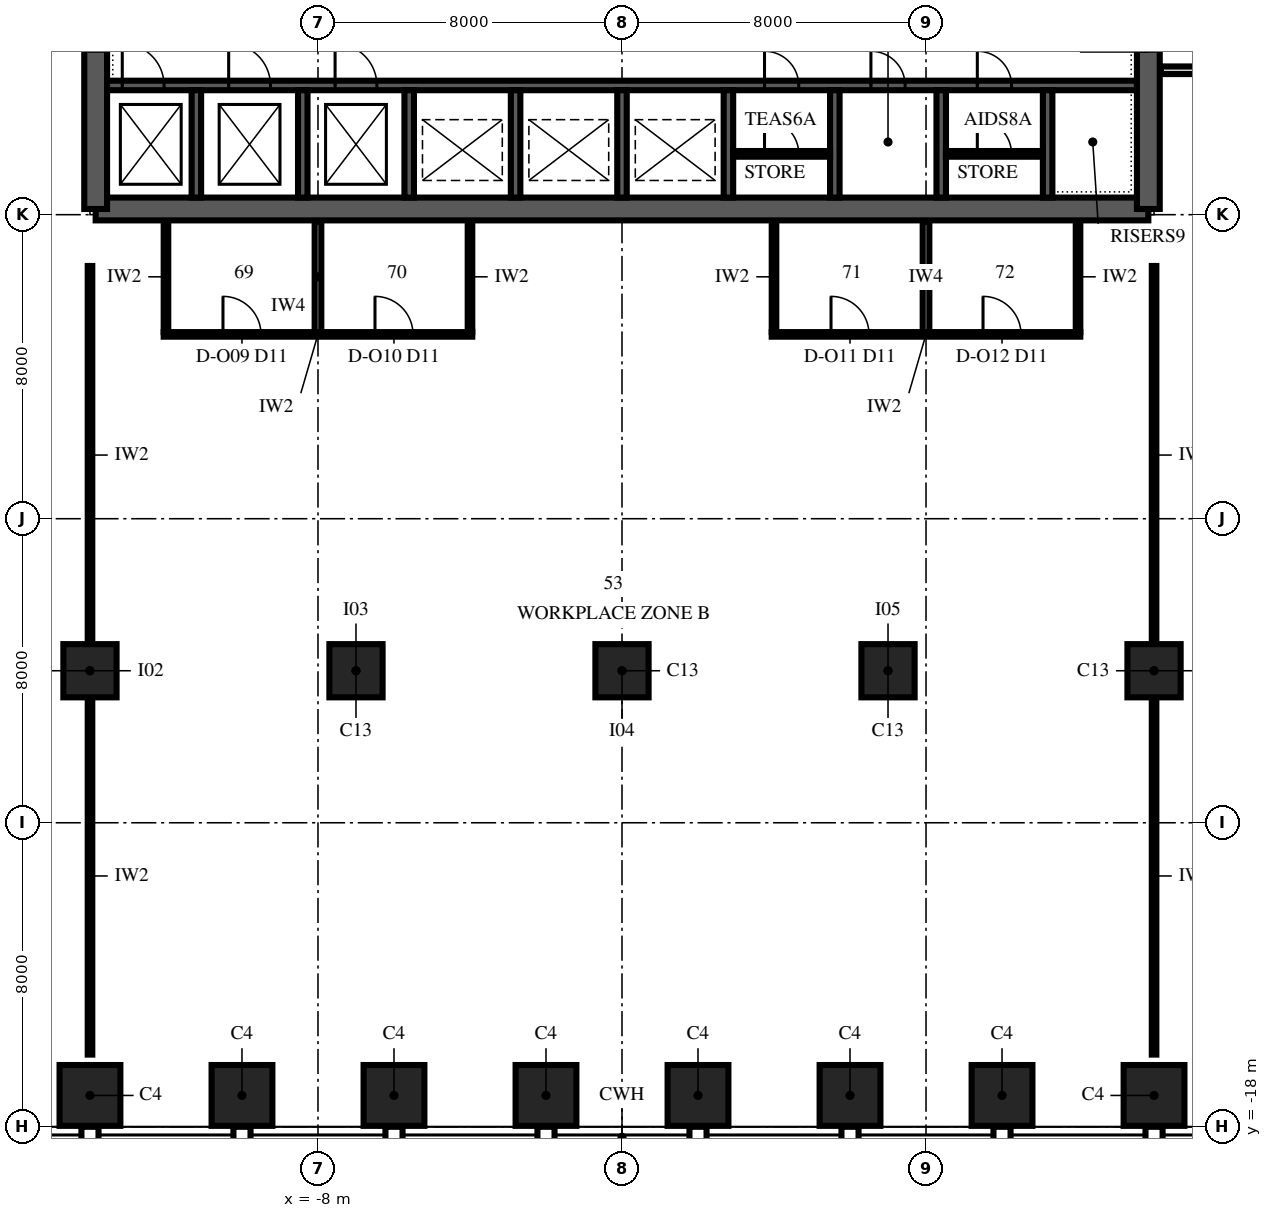
"""IFC4 building model, lengths in metres.
Left out: names, types, materials, properties, quantities, classifications, styles, units other than length and angle.
Written with IfcOpenShell. Run it as: python <this file> out.ifc"""

import sys

from ifc_helpers import new_model, si_unit, direction, frame, frame_2d, origin, origin_2d, place, context, subcontext, project, spatial, polyline, rectangle, outline, extrude, element, fill, save


model = new_model("IFC4")
c1 = context("Model", 3, precision=1e-05, world=origin(), true_north=direction((0.0, 1.0)))
c2 = subcontext(c1, "Body", "Model", "MODEL_VIEW")
j1 = project(units=[si_unit("LENGTHUNIT", "METRE"), si_unit("PLANEANGLEUNIT", "RADIAN")], contexts=[c1])
p1 = place(None, origin())
s1 = spatial("IfcSite", under=j1, at=p1, CompositionType="ELEMENT")
p2 = place(p1, origin())
s2 = spatial("IfcBuilding", under=s1, at=p2, CompositionType="ELEMENT")
p3 = place(p2, frame((0.0, 0.0, 214.0)))
s3 = spatial("IfcBuildingStorey", under=s2, at=p3, CompositionType="ELEMENT", Elevation=214.0)
for number, where, z_axis, x_axis in (
    (1, (-14.0, -17.175, 0.0), (0.0, 0.0, 1.0), (1.0, 0.0, 0.0)),
    (2, (-10.0, -17.175, 0.0), (0.0, 0.0, 1.0), (1.0, 0.0, 0.0)),
    (3, (-6.0, -17.175, 0.0), (0.0, 0.0, 1.0), (1.0, 0.0, 0.0)),
    (4, (-2.0, -17.175, 0.0), (0.0, 0.0, 1.0), (1.0, 0.0, 0.0)),
    (5, (2.0, -17.175, 0.0), (0.0, 0.0, 1.0), (1.0, 0.0, 0.0)),
    (6, (6.0, -17.175, 0.0), (0.0, 0.0, 1.0), (1.0, 0.0, 0.0)),
    (7, (10.0, -17.175, 0.0), (0.0, 0.0, 1.0), (1.0, 0.0, 0.0)),
    (8, (14.0, -17.175, 0.0), (0.0, 0.0, 1.0), (1.0, 0.0, 0.0)),
):
    element("IfcColumn", number, at=place(p3, frame(where, z_axis=z_axis, x_axis=x_axis)), inside=s3, PredefinedType="COLUMN", context=c2, shape_type="SweptSolid", body=[
        extrude(rectangle(XDim=1.6, YDim=1.6, at=origin_2d()), origin(), (0.0, 0.0, 1.0), 4.0),
    ])
for number, where, z_axis, x_axis in (
    (9, (-14.0, -6.0, 0.0), (0.0, 0.0, 1.0), (1.0, 0.0, 0.0)),
    (10, (-7.0, -6.0, 0.0), (0.0, 0.0, 1.0), (1.0, 0.0, 0.0)),
    (11, (0.0, -6.0, 0.0), (0.0, 0.0, 1.0), (1.0, 0.0, 0.0)),
    (12, (7.0, -6.0, 0.0), (0.0, 0.0, 1.0), (1.0, 0.0, 0.0)),
    (13, (14.0, -6.0, 0.0), (0.0, 0.0, 1.0), (1.0, 0.0, 0.0)),
):
    element("IfcColumn", number, at=place(p3, frame(where, z_axis=z_axis, x_axis=x_axis)), inside=s3, PredefinedType="COLUMN", context=c2, shape_type="SweptSolid", body=[
        extrude(rectangle(XDim=1.4, YDim=1.4, at=origin_2d()), origin(), (0.0, 0.0, 1.0), 4.0),
    ])
p4 = place(p3, frame((-13.85, 6.15, 0.0), z_axis=(0.0, 0.0, 1.0), x_axis=(1.0, 0.0, 0.0)))
e14 = element("IfcWall", 14, at=p4, inside=s3, PredefinedType="SHEAR", context=c2, shape_type="SweptSolid", body=[
    extrude(rectangle(XDim=27.7, YDim=0.6, at=frame_2d((13.85, 0.0))), origin(), (0.0, 0.0, 1.0), 4.0),
])
p5 = place(p3, frame((13.85, 6.15, 0.0), z_axis=(0.0, 0.0, 1.0), x_axis=(0.0, 1.0, 0.0)))
e15 = element("IfcWall", 15, at=p5, inside=s3, PredefinedType="SHEAR", context=c2, shape_type="SweptSolid", body=[
    extrude(outline(polyline([(0.0, -0.3), (17.7, -0.3), (17.7, 0.0), (17.4, 0.0), (17.4, 0.3), (0.3, 0.3), (0.3, 0.0), (0.0, 0.0), (0.0, -0.3)])), origin(), (0.0, 0.0, 1.0), 4.0),
])
p6 = place(p5, frame((4.15, 0.0, 0.0)))
e16 = element("IfcOpeningElement", 16, at=p6, cuts=e15, PredefinedType="OPENING", context=c2, shape_type="SweptSolid", body=[
    extrude(rectangle(XDim=1.8, YDim=2.4, at=frame_2d((0.9, 1.2))), frame((0.0, 0.315, 0.0), z_axis=(0.0, -1.0, 0.0), x_axis=(1.0, 0.0, 0.0)), (0.0, 0.0, 1.0), 0.63),
])
p7 = place(p3, frame((-13.85, 23.85, 0.0), z_axis=(0.0, 0.0, 1.0), x_axis=(0.0, -1.0, 0.0)))
e17 = element("IfcWall", 17, at=p7, inside=s3, PredefinedType="SHEAR", context=c2, shape_type="SweptSolid", body=[
    extrude(outline(polyline([(0.0, -0.3), (17.7, -0.3), (17.7, 0.0), (17.4, 0.0), (17.4, 0.3), (0.3, 0.3), (0.3, 0.0), (0.0, 0.0), (0.0, -0.3)])), origin(), (0.0, 0.0, 1.0), 4.0),
])
p8 = place(p7, frame((11.75, 0.0, 0.0)))
e18 = element("IfcOpeningElement", 18, at=p8, cuts=e17, PredefinedType="OPENING", context=c2, shape_type="SweptSolid", body=[
    extrude(rectangle(XDim=1.8, YDim=2.4, at=frame_2d((0.9, 1.2))), frame((0.0, 0.315, 0.0), z_axis=(0.0, -1.0, 0.0), x_axis=(1.0, 0.0, 0.0)), (0.0, 0.0, 1.0), 0.63),
])
p9 = place(p3, frame((-13.55, 9.4, 0.0), z_axis=(0.0, 0.0, 1.0), x_axis=(1.0, 0.0, 0.0)))
e19 = element("IfcWall", 19, at=p9, inside=s3, PredefinedType="SHEAR", context=c2, shape_type="SweptSolid", body=[
    extrude(rectangle(XDim=27.1, YDim=0.25, at=frame_2d((13.55, 0.0))), origin(), (0.0, 0.0, 1.0), 4.0),
])
p10 = place(p9, frame((0.4, 0.0, 0.0)))
e20 = element("IfcOpeningElement", 20, at=p10, cuts=e19, PredefinedType="OPENING", context=c2, shape_type="SweptSolid", body=[
    extrude(rectangle(XDim=1.1, YDim=2.1, at=frame_2d((0.55, 1.05))), frame((0.0, 0.14, 0.0), z_axis=(0.0, -1.0, 0.0), x_axis=(1.0, 0.0, 0.0)), (0.0, 0.0, 1.0), 0.28),
])
p11 = place(p9, frame((3.2, 0.0, 0.0)))
e21 = element("IfcOpeningElement", 21, at=p11, cuts=e19, PredefinedType="OPENING", context=c2, shape_type="SweptSolid", body=[
    extrude(rectangle(XDim=1.1, YDim=2.1, at=frame_2d((0.55, 1.05))), frame((0.0, 0.14, 0.0), z_axis=(0.0, -1.0, 0.0), x_axis=(1.0, 0.0, 0.0)), (0.0, 0.0, 1.0), 0.28),
])
p12 = place(p9, frame((6.0, 0.0, 0.0)))
e22 = element("IfcOpeningElement", 22, at=p12, cuts=e19, PredefinedType="OPENING", context=c2, shape_type="SweptSolid", body=[
    extrude(rectangle(XDim=1.1, YDim=2.1, at=frame_2d((0.55, 1.05))), frame((0.0, 0.14, 0.0), z_axis=(0.0, -1.0, 0.0), x_axis=(1.0, 0.0, 0.0)), (0.0, 0.0, 1.0), 0.28),
])
p13 = place(p9, frame((17.3, 0.0, 0.0)))
e23 = element("IfcOpeningElement", 23, at=p13, cuts=e19, PredefinedType="OPENING", context=c2, shape_type="SweptSolid", body=[
    extrude(rectangle(XDim=0.9, YDim=2.1, at=frame_2d((0.45, 1.05))), frame((0.0, 0.14, 0.0), z_axis=(0.0, -1.0, 0.0), x_axis=(1.0, 0.0, 0.0)), (0.0, 0.0, 1.0), 0.28),
])
p14 = place(p9, frame((20.1, 0.0, 0.0)))
e24 = element("IfcOpeningElement", 24, at=p14, cuts=e19, PredefinedType="OPENING", context=c2, shape_type="SweptSolid", body=[
    extrude(rectangle(XDim=0.9, YDim=2.1, at=frame_2d((0.45, 1.05))), frame((0.0, 0.14, 0.0), z_axis=(0.0, -1.0, 0.0), x_axis=(1.0, 0.0, 0.0)), (0.0, 0.0, 1.0), 0.28),
])
p15 = place(p9, frame((22.9, 0.0, 0.0)))
e25 = element("IfcOpeningElement", 25, at=p15, cuts=e19, PredefinedType="OPENING", context=c2, shape_type="SweptSolid", body=[
    extrude(rectangle(XDim=0.9, YDim=2.1, at=frame_2d((0.45, 1.05))), frame((0.0, 0.14, 0.0), z_axis=(0.0, -1.0, 0.0), x_axis=(1.0, 0.0, 0.0)), (0.0, 0.0, 1.0), 0.28),
])
for number, where, z_axis, x_axis in (
    (26, (-11.2, 6.45, 0.0), (0.0, 0.0, 1.0), (0.0, 1.0, 0.0)),
    (27, (-8.4, 6.45, 0.0), (0.0, 0.0, 1.0), (0.0, 1.0, 0.0)),
    (28, (-5.6, 6.45, 0.0), (0.0, 0.0, 1.0), (0.0, 1.0, 0.0)),
    (29, (-2.8, 6.45, 0.0), (0.0, 0.0, 1.0), (0.0, 1.0, 0.0)),
    (30, (0.0, 6.45, 0.0), (0.0, 0.0, 1.0), (0.0, 1.0, 0.0)),
    (31, (2.8, 6.45, 0.0), (0.0, 0.0, 1.0), (0.0, 1.0, 0.0)),
    (32, (5.6, 6.45, 0.0), (0.0, 0.0, 1.0), (0.0, 1.0, 0.0)),
    (33, (8.4, 6.45, 0.0), (0.0, 0.0, 1.0), (0.0, 1.0, 0.0)),
    (34, (11.2, 6.45, 0.0), (0.0, 0.0, 1.0), (0.0, 1.0, 0.0)),
):
    element("IfcWall", number, at=place(p3, frame(where, z_axis=z_axis, x_axis=x_axis)), inside=s3, PredefinedType="SHEAR", context=c2, shape_type="SweptSolid", body=[
        extrude(rectangle(XDim=2.825, YDim=0.25, at=frame_2d((1.413, 0.0))), origin(), (0.0, 0.0, 1.0), 4.0),
    ])
p16 = place(p3, frame((2.925, 7.6, 0.0), z_axis=(0.0, 0.0, 1.0), x_axis=(1.0, 0.0, 0.0)))
e35 = element("IfcWall", 35, at=p16, inside=s3, PredefinedType="PARTITIONING", context=c2, shape_type="SweptSolid", body=[
    extrude(rectangle(XDim=2.55, YDim=0.15, at=frame_2d((1.275, 0.0))), origin(), (0.0, 0.0, 1.0), 3.85),
])
p17 = place(p16, frame((0.825, 0.0, 0.0)))
e36 = element("IfcOpeningElement", 36, at=p17, cuts=e35, PredefinedType="OPENING", context=c2, shape_type="SweptSolid", body=[
    extrude(rectangle(XDim=0.9, YDim=2.1, at=frame_2d((0.45, 1.05))), frame((0.0, 0.09, 0.0), z_axis=(0.0, -1.0, 0.0), x_axis=(1.0, 0.0, 0.0)), (0.0, 0.0, 1.0), 0.18),
])
p18 = place(p3, frame((8.525, 7.6, 0.0), z_axis=(0.0, 0.0, 1.0), x_axis=(1.0, 0.0, 0.0)))
e37 = element("IfcWall", 37, at=p18, inside=s3, PredefinedType="PARTITIONING", context=c2, shape_type="SweptSolid", body=[
    extrude(rectangle(XDim=2.55, YDim=0.15, at=frame_2d((1.275, 0.0))), origin(), (0.0, 0.0, 1.0), 3.85),
])
p19 = place(p18, frame((0.825, 0.0, 0.0)))
e38 = element("IfcOpeningElement", 38, at=p19, cuts=e37, PredefinedType="OPENING", context=c2, shape_type="SweptSolid", body=[
    extrude(rectangle(XDim=0.9, YDim=2.1, at=frame_2d((0.45, 1.05))), frame((0.0, 0.09, 0.0), z_axis=(0.0, -1.0, 0.0), x_axis=(1.0, 0.0, 0.0)), (0.0, 0.0, 1.0), 0.18),
])
p20 = place(p3, frame((-12.06, 2.85, 0.0), z_axis=(0.0, 0.0, 1.0), x_axis=(1.0, 0.0, 0.0)))
e39 = element("IfcWall", 39, at=p20, inside=s3, PredefinedType="PARTITIONING", context=c2, shape_type="SweptSolid", body=[
    extrude(rectangle(XDim=8.12, YDim=0.12, at=frame_2d((4.06, 0.0))), origin(), (0.0, 0.0, 1.0), 3.25),
])
p21 = place(p20, frame((1.56, 0.0, 0.0)))
e40 = element("IfcOpeningElement", 40, at=p21, cuts=e39, PredefinedType="OPENING", context=c2, shape_type="SweptSolid", body=[
    extrude(rectangle(XDim=1.0, YDim=2.4, at=frame_2d((0.5, 1.2))), frame((0.0, 0.075, 0.0), z_axis=(0.0, -1.0, 0.0), x_axis=(1.0, 0.0, 0.0)), (0.0, 0.0, 1.0), 0.15),
])
p22 = place(p20, frame((5.56, 0.0, 0.0)))
e41 = element("IfcOpeningElement", 41, at=p22, cuts=e39, PredefinedType="OPENING", context=c2, shape_type="SweptSolid", body=[
    extrude(rectangle(XDim=1.0, YDim=2.4, at=frame_2d((0.5, 1.2))), frame((0.0, 0.075, 0.0), z_axis=(0.0, -1.0, 0.0), x_axis=(1.0, 0.0, 0.0)), (0.0, 0.0, 1.0), 0.15),
])
p23 = place(p3, frame((3.94, 2.85, 0.0), z_axis=(0.0, 0.0, 1.0), x_axis=(1.0, 0.0, 0.0)))
e42 = element("IfcWall", 42, at=p23, inside=s3, PredefinedType="PARTITIONING", context=c2, shape_type="SweptSolid", body=[
    extrude(rectangle(XDim=8.12, YDim=0.12, at=frame_2d((4.06, 0.0))), origin(), (0.0, 0.0, 1.0), 3.25),
])
p24 = place(p23, frame((1.56, 0.0, 0.0)))
e43 = element("IfcOpeningElement", 43, at=p24, cuts=e42, PredefinedType="OPENING", context=c2, shape_type="SweptSolid", body=[
    extrude(rectangle(XDim=1.0, YDim=2.4, at=frame_2d((0.5, 1.2))), frame((0.0, 0.075, 0.0), z_axis=(0.0, -1.0, 0.0), x_axis=(1.0, 0.0, 0.0)), (0.0, 0.0, 1.0), 0.15),
])
p25 = place(p23, frame((5.56, 0.0, 0.0)))
e44 = element("IfcOpeningElement", 44, at=p25, cuts=e42, PredefinedType="OPENING", context=c2, shape_type="SweptSolid", body=[
    extrude(rectangle(XDim=1.0, YDim=2.4, at=frame_2d((0.5, 1.2))), frame((0.0, 0.075, 0.0), z_axis=(0.0, -1.0, 0.0), x_axis=(1.0, 0.0, 0.0)), (0.0, 0.0, 1.0), 0.15),
])
p26 = place(p3, frame((14.18, 9.8, 0.0), z_axis=(0.0, 0.0, 1.0), x_axis=(1.0, 0.0, 0.0)))
e45 = element("IfcWall", 45, at=p26, inside=s3, PredefinedType="PARTITIONING", context=c2, shape_type="SweptSolid", body=[
    extrude(rectangle(XDim=2.02, YDim=0.2, at=frame_2d((1.01, 0.0))), origin(), (0.0, 0.0, 1.0), 3.85),
])
p27 = place(p3, frame((-12.0, 2.91, 0.0), z_axis=(0.0, 0.0, 1.0), x_axis=(0.0, 1.0, 0.0)))
e46 = element("IfcWall", 46, at=p27, inside=s3, PredefinedType="PARTITIONING", context=c2, shape_type="SweptSolid", body=[
    extrude(rectangle(XDim=2.91, YDim=0.12, at=frame_2d((1.455, 0.0))), origin(), (0.0, 0.0, 1.0), 3.85),
])
p28 = place(p3, frame((-8.0, 2.91, 0.0), z_axis=(0.0, 0.0, 1.0), x_axis=(0.0, 1.0, 0.0)))
e47 = element("IfcWall", 47, at=p28, inside=s3, PredefinedType="PARTITIONING", context=c2, shape_type="SweptSolid", body=[
    extrude(rectangle(XDim=2.91, YDim=0.175, at=frame_2d((1.455, 0.0))), origin(), (0.0, 0.0, 1.0), 3.85),
])
for number, where, z_axis, x_axis in (
    (48, (-4.0, 2.91, 0.0), (0.0, 0.0, 1.0), (0.0, 1.0, 0.0)),
    (49, (4.0, 2.91, 0.0), (0.0, 0.0, 1.0), (0.0, 1.0, 0.0)),
):
    element("IfcWall", number, at=place(p3, frame(where, z_axis=z_axis, x_axis=x_axis)), inside=s3, PredefinedType="PARTITIONING", context=c2, shape_type="SweptSolid", body=[
        extrude(rectangle(XDim=2.91, YDim=0.12, at=frame_2d((1.455, 0.0))), origin(), (0.0, 0.0, 1.0), 3.85),
    ])
p29 = place(p3, frame((8.0, 2.91, 0.0), z_axis=(0.0, 0.0, 1.0), x_axis=(0.0, 1.0, 0.0)))
e50 = element("IfcWall", 50, at=p29, inside=s3, PredefinedType="PARTITIONING", context=c2, shape_type="SweptSolid", body=[
    extrude(rectangle(XDim=2.91, YDim=0.175, at=frame_2d((1.455, 0.0))), origin(), (0.0, 0.0, 1.0), 3.85),
])
p30 = place(p3, frame((12.0, 2.91, 0.0), z_axis=(0.0, 0.0, 1.0), x_axis=(0.0, 1.0, 0.0)))
e51 = element("IfcWall", 51, at=p30, inside=s3, PredefinedType="PARTITIONING", context=c2, shape_type="SweptSolid", body=[
    extrude(rectangle(XDim=2.91, YDim=0.12, at=frame_2d((1.455, 0.0))), origin(), (0.0, 0.0, 1.0), 3.85),
])
p31 = place(p3, frame((-13.999, -16.1, 0.0), z_axis=(0.0, 0.0, 1.0), x_axis=(0.0, 1.0, 0.0)))
e52 = element("IfcWall", 52, at=p31, inside=s3, PredefinedType="PARTITIONING", context=c2, shape_type="SweptSolid", body=[
    extrude(rectangle(XDim=9.4, YDim=0.12, at=frame_2d((4.7, 0.0))), origin(), (0.0, 0.0, 1.0), 3.25),
])
p32 = place(p3, frame((-13.999, -5.3, 0.0), z_axis=(0.0, 0.0, 1.0), x_axis=(0.0, 1.0, 0.0)))
e53 = element("IfcWall", 53, at=p32, inside=s3, PredefinedType="PARTITIONING", context=c2, shape_type="SweptSolid", body=[
    extrude(rectangle(XDim=9.95, YDim=0.12, at=frame_2d((4.975, 0.0))), origin(), (0.0, 0.0, 1.0), 3.25),
])
p33 = place(p3, frame((14.001, -16.1, 0.0), z_axis=(0.0, 0.0, 1.0), x_axis=(0.0, 1.0, 0.0)))
e54 = element("IfcWall", 54, at=p33, inside=s3, PredefinedType="PARTITIONING", context=c2, shape_type="SweptSolid", body=[
    extrude(rectangle(XDim=9.4, YDim=0.12, at=frame_2d((4.7, 0.0))), origin(), (0.0, 0.0, 1.0), 3.25),
])
p34 = place(p3, frame((14.001, -5.3, 0.0), z_axis=(0.0, 0.0, 1.0), x_axis=(0.0, 1.0, 0.0)))
e55 = element("IfcWall", 55, at=p34, inside=s3, PredefinedType="PARTITIONING", context=c2, shape_type="SweptSolid", body=[
    extrude(rectangle(XDim=9.95, YDim=0.12, at=frame_2d((4.975, 0.0))), origin(), (0.0, 0.0, 1.0), 3.25),
])
p35 = place(p10, origin())
e56 = element("IfcDoor", 56, at=p35, inside=s3, OperationType="SLIDING_TO_LEFT", PredefinedType="DOOR", context=c2, shape_type="SweptSolid", body=[
    extrude(rectangle(XDim=1.1, YDim=2.1, at=frame_2d((0.55, 1.05))), frame((0.0, 0.125, 0.0), z_axis=(0.0, -1.0, 0.0), x_axis=(1.0, 0.0, 0.0)), (0.0, 0.0, 1.0), 0.25),
])
fill(e20, e56)
p36 = place(p11, origin())
e57 = element("IfcDoor", 57, at=p36, inside=s3, OperationType="SLIDING_TO_LEFT", PredefinedType="DOOR", context=c2, shape_type="SweptSolid", body=[
    extrude(rectangle(XDim=1.1, YDim=2.1, at=frame_2d((0.55, 1.05))), frame((0.0, 0.125, 0.0), z_axis=(0.0, -1.0, 0.0), x_axis=(1.0, 0.0, 0.0)), (0.0, 0.0, 1.0), 0.25),
])
fill(e21, e57)
p37 = place(p12, origin())
e58 = element("IfcDoor", 58, at=p37, inside=s3, OperationType="SLIDING_TO_LEFT", PredefinedType="DOOR", context=c2, shape_type="SweptSolid", body=[
    extrude(rectangle(XDim=1.1, YDim=2.1, at=frame_2d((0.55, 1.05))), frame((0.0, 0.125, 0.0), z_axis=(0.0, -1.0, 0.0), x_axis=(1.0, 0.0, 0.0)), (0.0, 0.0, 1.0), 0.25),
])
fill(e22, e58)
p38 = place(p13, origin())
e59 = element("IfcDoor", 59, at=p38, inside=s3, OperationType="SINGLE_SWING_LEFT", PredefinedType="DOOR", context=c2, shape_type="SweptSolid", body=[
    extrude(rectangle(XDim=0.9, YDim=2.1, at=frame_2d((0.45, 1.05))), frame((0.0, 0.125, 0.0), z_axis=(0.0, -1.0, 0.0), x_axis=(1.0, 0.0, 0.0)), (0.0, 0.0, 1.0), 0.25),
])
fill(e23, e59)
p39 = place(p17, origin())
e60 = element("IfcDoor", 60, at=p39, inside=s3, OperationType="SINGLE_SWING_LEFT", PredefinedType="DOOR", context=c2, shape_type="SweptSolid", body=[
    extrude(rectangle(XDim=0.9, YDim=2.1, at=frame_2d((0.45, 1.05))), frame((0.0, 0.075, 0.0), z_axis=(0.0, -1.0, 0.0), x_axis=(1.0, 0.0, 0.0)), (0.0, 0.0, 1.0), 0.149),
])
fill(e36, e60)
p40 = place(p14, origin())
e61 = element("IfcDoor", 61, at=p40, inside=s3, OperationType="SINGLE_SWING_LEFT", PredefinedType="DOOR", context=c2, shape_type="SweptSolid", body=[
    extrude(rectangle(XDim=0.9, YDim=2.1, at=frame_2d((0.45, 1.05))), frame((0.0, 0.125, 0.0), z_axis=(0.0, -1.0, 0.0), x_axis=(1.0, 0.0, 0.0)), (0.0, 0.0, 1.0), 0.25),
])
fill(e24, e61)
p41 = place(p15, origin())
e62 = element("IfcDoor", 62, at=p41, inside=s3, OperationType="SINGLE_SWING_LEFT", PredefinedType="DOOR", context=c2, shape_type="SweptSolid", body=[
    extrude(rectangle(XDim=0.9, YDim=2.1, at=frame_2d((0.45, 1.05))), frame((0.0, 0.125, 0.0), z_axis=(0.0, -1.0, 0.0), x_axis=(1.0, 0.0, 0.0)), (0.0, 0.0, 1.0), 0.25),
])
fill(e25, e62)
p42 = place(p19, origin())
e63 = element("IfcDoor", 63, at=p42, inside=s3, OperationType="SINGLE_SWING_LEFT", PredefinedType="DOOR", context=c2, shape_type="SweptSolid", body=[
    extrude(rectangle(XDim=0.9, YDim=2.1, at=frame_2d((0.45, 1.05))), frame((0.0, 0.075, 0.0), z_axis=(0.0, -1.0, 0.0), x_axis=(1.0, 0.0, 0.0)), (0.0, 0.0, 1.0), 0.149),
])
fill(e38, e63)
p43 = place(p21, origin())
e64 = element("IfcDoor", 64, at=p43, inside=s3, OperationType="SINGLE_SWING_RIGHT", PredefinedType="DOOR", context=c2, shape_type="SweptSolid", body=[
    extrude(rectangle(XDim=1.0, YDim=2.4, at=frame_2d((0.5, 1.2))), frame((0.0, 0.06, 0.0), z_axis=(0.0, -1.0, 0.0), x_axis=(1.0, 0.0, 0.0)), (0.0, 0.0, 1.0), 0.12),
])
fill(e40, e64)
p44 = place(p22, origin())
e65 = element("IfcDoor", 65, at=p44, inside=s3, OperationType="SINGLE_SWING_RIGHT", PredefinedType="DOOR", context=c2, shape_type="SweptSolid", body=[
    extrude(rectangle(XDim=1.0, YDim=2.4, at=frame_2d((0.5, 1.2))), frame((0.0, 0.06, 0.0), z_axis=(0.0, -1.0, 0.0), x_axis=(1.0, 0.0, 0.0)), (0.0, 0.0, 1.0), 0.12),
])
fill(e41, e65)
p45 = place(p24, origin())
e66 = element("IfcDoor", 66, at=p45, inside=s3, OperationType="SINGLE_SWING_RIGHT", PredefinedType="DOOR", context=c2, shape_type="SweptSolid", body=[
    extrude(rectangle(XDim=1.0, YDim=2.4, at=frame_2d((0.5, 1.2))), frame((0.0, 0.06, 0.0), z_axis=(0.0, -1.0, 0.0), x_axis=(1.0, 0.0, 0.0)), (0.0, 0.0, 1.0), 0.12),
])
fill(e43, e66)
p46 = place(p25, origin())
e67 = element("IfcDoor", 67, at=p46, inside=s3, OperationType="SINGLE_SWING_RIGHT", PredefinedType="DOOR", context=c2, shape_type="SweptSolid", body=[
    extrude(rectangle(XDim=1.0, YDim=2.4, at=frame_2d((0.5, 1.2))), frame((0.0, 0.06, 0.0), z_axis=(0.0, -1.0, 0.0), x_axis=(1.0, 0.0, 0.0)), (0.0, 0.0, 1.0), 0.12),
])
fill(e44, e67)
save(model, sys.argv[1])
